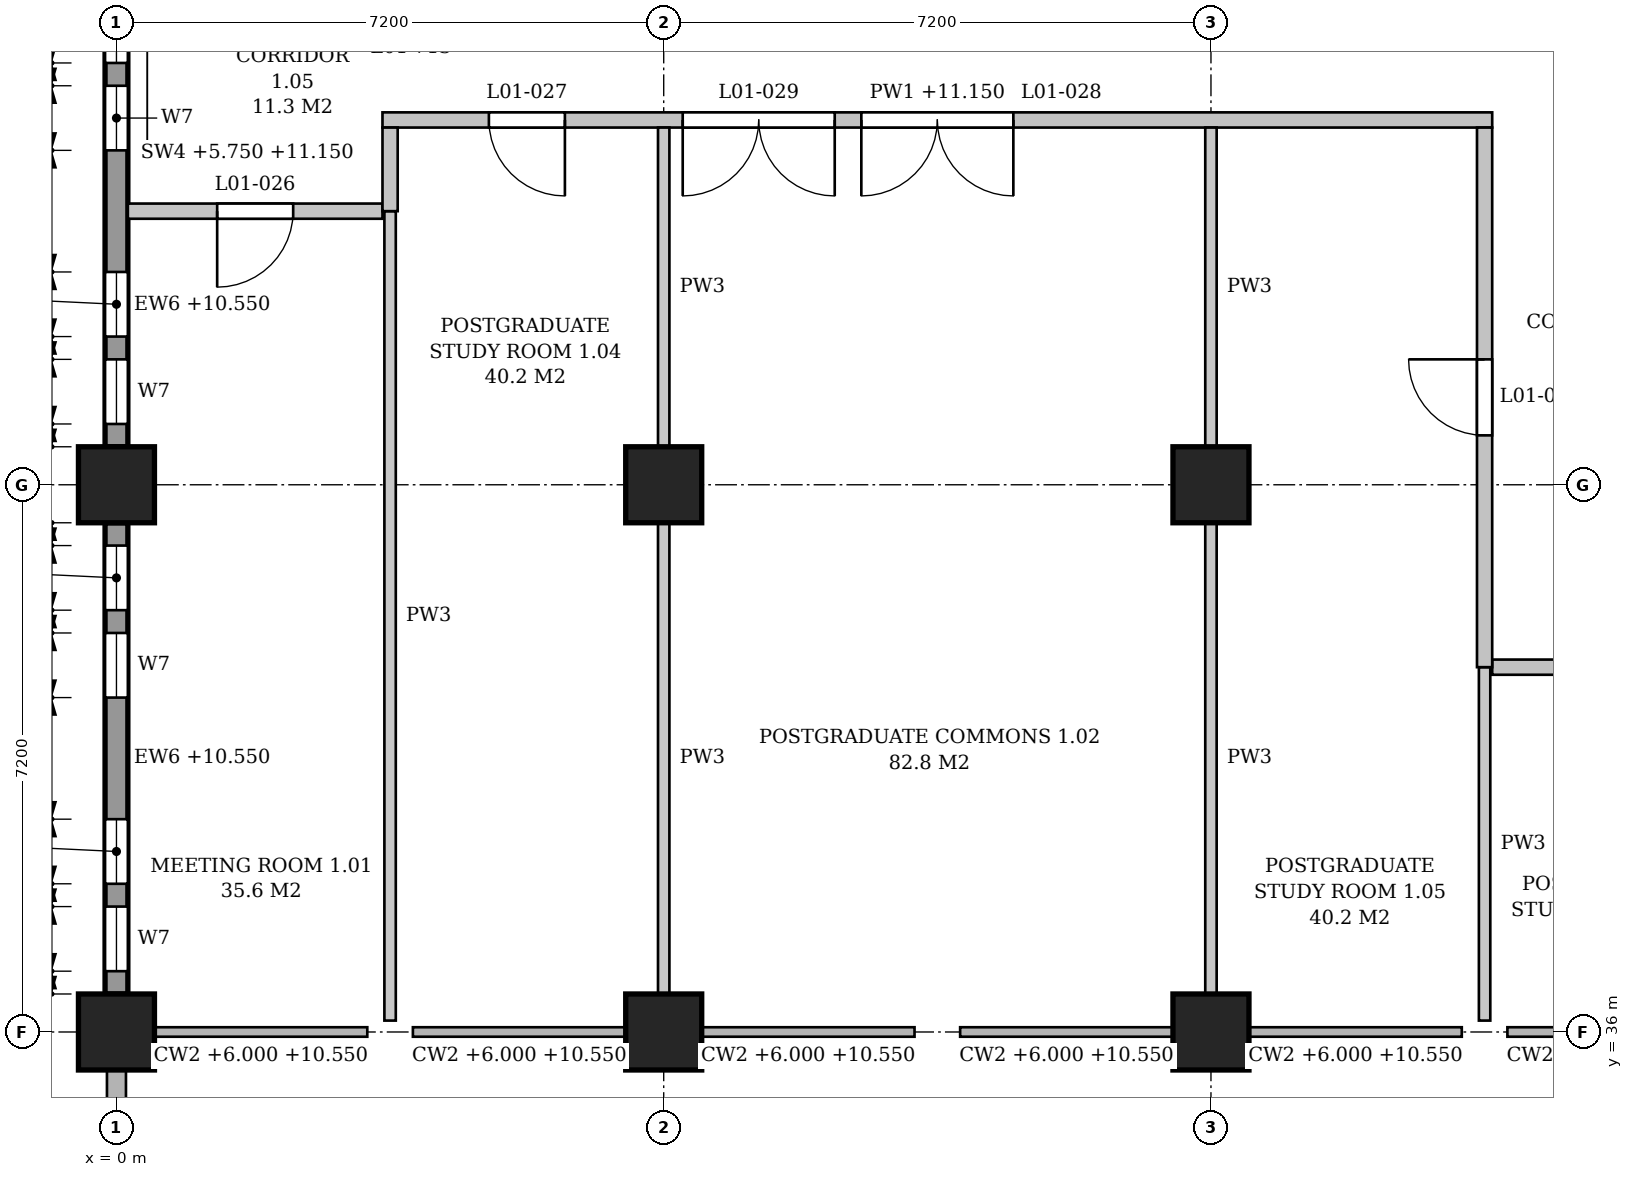
"""IFC4 building model, lengths in metres.
Left out: names, types, materials, properties, quantities, classifications, styles, units other than length and angle.
Written with IfcOpenShell. Run it as: python <this file> out.ifc"""

import sys

from ifc_helpers import new_model, si_unit, direction, frame, frame_2d, origin, origin_2d, place, context, subcontext, project, spatial, polyline, rectangle, outline, extrude, element, fill, save


model = new_model("IFC4")
c1 = context("Model", 3, precision=1e-05, world=origin(), true_north=direction((0.0, 1.0)))
c2 = subcontext(c1, "Body", "Model", "MODEL_VIEW")
j1 = project(units=[si_unit("LENGTHUNIT", "METRE"), si_unit("PLANEANGLEUNIT", "RADIAN")], contexts=[c1])
p1 = place(None, origin())
s1 = spatial("IfcSite", under=j1, at=p1, CompositionType="ELEMENT")
p2 = place(p1, origin())
s2 = spatial("IfcBuilding", under=s1, at=p2, CompositionType="ELEMENT")
p3 = place(p2, frame((0.0, 0.0, 6.0)))
s3 = spatial("IfcBuildingStorey", under=s2, at=p3, CompositionType="ELEMENT", Elevation=6.0)
for number, where, z_axis, x_axis in (
    (1, (0.0, 36.0, 0.0), (0.0, 0.0, 1.0), (1.0, 0.0, 0.0)),
    (2, (0.0, 43.2, 0.0), (0.0, 0.0, 1.0), (1.0, 0.0, 0.0)),
    (3, (7.2, 36.0, 0.0), (0.0, 0.0, 1.0), (1.0, 0.0, 0.0)),
    (4, (7.2, 43.2, 0.0), (0.0, 0.0, 1.0), (1.0, 0.0, 0.0)),
    (5, (14.4, 36.0, 0.0), (0.0, 0.0, 1.0), (1.0, 0.0, 0.0)),
    (6, (14.4, 43.2, 0.0), (0.0, 0.0, 1.0), (1.0, 0.0, 0.0)),
):
    element("IfcColumn", number, at=place(p3, frame(where, z_axis=z_axis, x_axis=x_axis)), inside=s3, PredefinedType="COLUMN", context=c2, shape_type="SweptSolid", body=[
        extrude(rectangle(XDim=1.0, YDim=1.0, at=origin_2d()), origin(), (0.0, 0.0, 1.0), 5.4),
    ])
p4 = place(p3, frame((0.0, 36.5, 0.0), z_axis=(0.0, 0.0, 1.0), x_axis=(0.0, 1.0, 0.0)))
e7 = element("IfcWall", 7, at=p4, inside=s3, PredefinedType="STANDARD", context=c2, shape_type="SweptSolid", body=[
    extrude(rectangle(XDim=6.2, YDim=0.3, at=frame_2d((3.1, 0.0))), origin(), (0.0, 0.0, 1.0), 4.55),
])
p5 = place(p4, frame((0.3, 0.0, 0.9)))
e8 = element("IfcOpeningElement", 8, at=p5, cuts=e7, PredefinedType="OPENING", context=c2, shape_type="SweptSolid", body=[
    extrude(outline(polyline([(0.0, 0.0), (0.85, 0.0), (0.85, 3.15), (0.425, 3.6), (0.0, 3.15), (0.0, 0.0)])), frame((0.0, 0.16, 0.0), z_axis=(0.0, -1.0, 0.0), x_axis=(1.0, 0.0, 0.0)), (0.0, 0.0, 1.0), 0.32),
])
p6 = place(p4, frame((1.45, 0.0, 0.9)))
e9 = element("IfcOpeningElement", 9, at=p6, cuts=e7, PredefinedType="OPENING", context=c2, shape_type="SweptSolid", body=[
    extrude(outline(polyline([(0.0, 0.0), (0.85, 0.0), (0.85, 3.15), (0.425, 3.6), (0.0, 3.15), (0.0, 0.0)])), frame((0.0, 0.16, 0.0), z_axis=(0.0, -1.0, 0.0), x_axis=(1.0, 0.0, 0.0)), (0.0, 0.0, 1.0), 0.32),
])
p7 = place(p4, frame((3.9, 0.0, 0.9)))
e10 = element("IfcOpeningElement", 10, at=p7, cuts=e7, PredefinedType="OPENING", context=c2, shape_type="SweptSolid", body=[
    extrude(outline(polyline([(0.0, 0.0), (0.85, 0.0), (0.85, 3.15), (0.425, 3.6), (0.0, 3.15), (0.0, 0.0)])), frame((0.0, 0.16, 0.0), z_axis=(0.0, -1.0, 0.0), x_axis=(1.0, 0.0, 0.0)), (0.0, 0.0, 1.0), 0.32),
])
p8 = place(p4, frame((5.05, 0.0, 0.9)))
e11 = element("IfcOpeningElement", 11, at=p8, cuts=e7, PredefinedType="OPENING", context=c2, shape_type="SweptSolid", body=[
    extrude(outline(polyline([(0.0, 0.0), (0.85, 0.0), (0.85, 3.15), (0.425, 3.6), (0.0, 3.15), (0.0, 0.0)])), frame((0.0, 0.16, 0.0), z_axis=(0.0, -1.0, 0.0), x_axis=(1.0, 0.0, 0.0)), (0.0, 0.0, 1.0), 0.32),
])
p9 = place(p3, frame((0.0, 43.7, 0.0), z_axis=(0.0, 0.0, 1.0), x_axis=(0.0, 1.0, 0.0)))
e12 = element("IfcWall", 12, at=p9, inside=s3, PredefinedType="STANDARD", context=c2, shape_type="SweptSolid", body=[
    extrude(rectangle(XDim=6.2, YDim=0.3, at=frame_2d((3.1, 0.0))), origin(), (0.0, 0.0, 1.0), 4.55),
])
p10 = place(p9, frame((0.3, 0.0, 0.9)))
e13 = element("IfcOpeningElement", 13, at=p10, cuts=e12, PredefinedType="OPENING", context=c2, shape_type="SweptSolid", body=[
    extrude(outline(polyline([(0.0, 0.0), (0.85, 0.0), (0.85, 3.15), (0.425, 3.6), (0.0, 3.15), (0.0, 0.0)])), frame((0.0, 0.16, 0.0), z_axis=(0.0, -1.0, 0.0), x_axis=(1.0, 0.0, 0.0)), (0.0, 0.0, 1.0), 0.32),
])
p11 = place(p9, frame((1.45, 0.0, 0.9)))
e14 = element("IfcOpeningElement", 14, at=p11, cuts=e12, PredefinedType="OPENING", context=c2, shape_type="SweptSolid", body=[
    extrude(outline(polyline([(0.0, 0.0), (0.85, 0.0), (0.85, 3.15), (0.425, 3.6), (0.0, 3.15), (0.0, 0.0)])), frame((0.0, 0.16, 0.0), z_axis=(0.0, -1.0, 0.0), x_axis=(1.0, 0.0, 0.0)), (0.0, 0.0, 1.0), 0.32),
])
p12 = place(p9, frame((3.9, 0.0, 0.9)))
e15 = element("IfcOpeningElement", 15, at=p12, cuts=e12, PredefinedType="OPENING", context=c2, shape_type="SweptSolid", body=[
    extrude(outline(polyline([(0.0, 0.0), (0.85, 0.0), (0.85, 3.15), (0.425, 3.6), (0.0, 3.15), (0.0, 0.0)])), frame((0.0, 0.16, 0.0), z_axis=(0.0, -1.0, 0.0), x_axis=(1.0, 0.0, 0.0)), (0.0, 0.0, 1.0), 0.32),
])
p13 = place(p9, frame((5.05, 0.0, 0.9)))
e16 = element("IfcOpeningElement", 16, at=p13, cuts=e12, PredefinedType="OPENING", context=c2, shape_type="SweptSolid", body=[
    extrude(outline(polyline([(0.0, 0.0), (0.85, 0.0), (0.85, 3.15), (0.425, 3.6), (0.0, 3.15), (0.0, 0.0)])), frame((0.0, 0.16, 0.0), z_axis=(0.0, -1.0, 0.0), x_axis=(1.0, 0.0, 0.0)), (0.0, 0.0, 1.0), 0.32),
])
p14 = place(p3, frame((18.1, 40.8, 0.0), z_axis=(0.0, 0.0, 1.0), x_axis=(1.0, 0.0, 0.0)))
e17 = element("IfcWall", 17, at=p14, inside=s3, PredefinedType="PARTITIONING", context=c2, shape_type="SweptSolid", body=[
    extrude(outline(polyline([(0.0, 0.0), (3.4, 0.0), (3.4, 4.4), (3.25, 4.4), (3.25, 5.15), (0.0, 5.15), (0.0, 0.0)])), frame((0.0, 0.1, 0.0), z_axis=(0.0, -1.0, 0.0), x_axis=(1.0, 0.0, 0.0)), (0.0, 0.0, 1.0), 0.2),
])
p15 = place(p14, frame((1.2, 0.0, 0.0)))
e18 = element("IfcOpeningElement", 18, at=p15, cuts=e17, PredefinedType="OPENING", context=c2, shape_type="SweptSolid", body=[
    extrude(rectangle(XDim=1.0, YDim=2.1, at=frame_2d((0.5, 1.05))), frame((0.0, 0.11, 0.0), z_axis=(0.0, -1.0, 0.0), x_axis=(1.0, 0.0, 0.0)), (0.0, 0.0, 1.0), 0.22),
])
p16 = place(p3, frame((0.15, 46.8, 0.0), z_axis=(0.0, 0.0, 1.0), x_axis=(1.0, 0.0, 0.0)))
e19 = element("IfcWall", 19, at=p16, inside=s3, PredefinedType="PARTITIONING", context=c2, shape_type="SweptSolid", body=[
    extrude(outline(polyline([(0.0, 0.0), (3.35, 0.0), (3.35, 5.15), (0.1, 5.15), (0.1, 4.55), (0.0, 4.55), (0.0, 0.0)])), frame((0.0, 0.1, 0.0), z_axis=(0.0, -1.0, 0.0), x_axis=(1.0, 0.0, 0.0)), (0.0, 0.0, 1.0), 0.2),
])
p17 = place(p16, frame((1.175, 0.0, 0.0)))
e20 = element("IfcOpeningElement", 20, at=p17, cuts=e19, PredefinedType="OPENING", context=c2, shape_type="SweptSolid", body=[
    extrude(rectangle(XDim=1.0, YDim=2.1, at=frame_2d((0.5, 1.05))), frame((0.0, 0.11, 0.0), z_axis=(0.0, -1.0, 0.0), x_axis=(1.0, 0.0, 0.0)), (0.0, 0.0, 1.0), 0.22),
])
p18 = place(p3, frame((3.5, 48.0, 0.0), z_axis=(0.0, 0.0, 1.0), x_axis=(1.0, 0.0, 0.0)))
e21 = element("IfcWall", 21, at=p18, inside=s3, PredefinedType="PARTITIONING", context=c2, shape_type="SweptSolid", body=[
    extrude(outline(polyline([(0.0, 0.0), (14.6, 0.0), (14.6, 5.15), (11.15, 5.15), (11.15, 4.4), (10.65, 4.4), (10.65, 5.15), (3.95, 5.15), (3.95, 4.4), (3.45, 4.4), (3.45, 5.15), (0.0, 5.15), (0.0, 0.0)])), frame((0.0, 0.1, 0.0), z_axis=(0.0, -1.0, 0.0), x_axis=(1.0, 0.0, 0.0)), (0.0, 0.0, 1.0), 0.2),
])
p19 = place(p18, frame((1.4, 0.0, 0.0)))
e22 = element("IfcOpeningElement", 22, at=p19, cuts=e21, PredefinedType="OPENING", context=c2, shape_type="SweptSolid", body=[
    extrude(rectangle(XDim=1.0, YDim=2.1, at=frame_2d((0.5, 1.05))), frame((0.0, 0.11, 0.0), z_axis=(0.0, -1.0, 0.0), x_axis=(1.0, 0.0, 0.0)), (0.0, 0.0, 1.0), 0.22),
])
p20 = place(p18, frame((6.3, 0.0, 0.0)))
e23 = element("IfcOpeningElement", 23, at=p20, cuts=e21, PredefinedType="OPENING", context=c2, shape_type="SweptSolid", body=[
    extrude(rectangle(XDim=2.0, YDim=2.1, at=frame_2d((1.0, 1.05))), frame((0.0, 0.11, 0.0), z_axis=(0.0, -1.0, 0.0), x_axis=(1.0, 0.0, 0.0)), (0.0, 0.0, 1.0), 0.22),
])
p21 = place(p18, frame((3.95, 0.0, 0.0)))
e24 = element("IfcOpeningElement", 24, at=p21, cuts=e21, PredefinedType="OPENING", context=c2, shape_type="SweptSolid", body=[
    extrude(rectangle(XDim=2.0, YDim=2.1, at=frame_2d((1.0, 1.05))), frame((0.0, 0.11, 0.0), z_axis=(0.0, -1.0, 0.0), x_axis=(1.0, 0.0, 0.0)), (0.0, 0.0, 1.0), 0.22),
])
p22 = place(p3, frame((3.6, 36.15, 0.0), z_axis=(0.0, 0.0, 1.0), x_axis=(0.0, 1.0, 0.0)))
e25 = element("IfcWall", 25, at=p22, inside=s3, PredefinedType="PARTITIONING", context=c2, shape_type="SweptSolid", body=[
    extrude(rectangle(XDim=10.65, YDim=0.15, at=frame_2d((5.325, 0.0))), origin(), (0.0, 0.0, 1.0), 4.4),
])
p23 = place(p3, frame((3.6, 46.8, 0.0), z_axis=(0.0, 0.0, 1.0), x_axis=(0.0, 1.0, 0.0)))
e26 = element("IfcWall", 26, at=p23, inside=s3, PredefinedType="PARTITIONING", context=c2, shape_type="SweptSolid", body=[
    extrude(rectangle(XDim=1.1, YDim=0.2, at=frame_2d((0.55, 0.0))), origin(), (0.0, 0.0, 1.0), 5.15),
])
p24 = place(p3, frame((7.2, 36.5, 0.0), z_axis=(0.0, 0.0, 1.0), x_axis=(0.0, 1.0, 0.0)))
e27 = element("IfcWall", 27, at=p24, inside=s3, PredefinedType="PARTITIONING", context=c2, shape_type="SweptSolid", body=[
    extrude(rectangle(XDim=6.2, YDim=0.15, at=frame_2d((3.1, 0.0))), origin(), (0.0, 0.0, 1.0), 4.4),
])
p25 = place(p3, frame((7.2, 43.7, 0.0), z_axis=(0.0, 0.0, 1.0), x_axis=(0.0, 1.0, 0.0)))
e28 = element("IfcWall", 28, at=p25, inside=s3, PredefinedType="PARTITIONING", context=c2, shape_type="SweptSolid", body=[
    extrude(rectangle(XDim=4.2, YDim=0.15, at=frame_2d((2.1, 0.0))), origin(), (0.0, 0.0, 1.0), 4.4),
])
p26 = place(p3, frame((14.4, 36.5, 0.0), z_axis=(0.0, 0.0, 1.0), x_axis=(0.0, 1.0, 0.0)))
e29 = element("IfcWall", 29, at=p26, inside=s3, PredefinedType="PARTITIONING", context=c2, shape_type="SweptSolid", body=[
    extrude(rectangle(XDim=6.2, YDim=0.15, at=frame_2d((3.1, 0.0))), origin(), (0.0, 0.0, 1.0), 4.4),
])
p27 = place(p3, frame((14.4, 43.7, 0.0), z_axis=(0.0, 0.0, 1.0), x_axis=(0.0, 1.0, 0.0)))
e30 = element("IfcWall", 30, at=p27, inside=s3, PredefinedType="PARTITIONING", context=c2, shape_type="SweptSolid", body=[
    extrude(rectangle(XDim=4.2, YDim=0.15, at=frame_2d((2.1, 0.0))), origin(), (0.0, 0.0, 1.0), 4.4),
])
p28 = place(p3, frame((18.0, 36.15, 0.0), z_axis=(0.0, 0.0, 1.0), x_axis=(0.0, 1.0, 0.0)))
e31 = element("IfcWall", 31, at=p28, inside=s3, PredefinedType="PARTITIONING", context=c2, shape_type="SweptSolid", body=[
    extrude(rectangle(XDim=4.65, YDim=0.15, at=frame_2d((2.325, 0.0))), origin(), (0.0, 0.0, 1.0), 4.4),
])
p29 = place(p3, frame((18.0, 40.8, 0.0), z_axis=(0.0, 0.0, 1.0), x_axis=(0.0, 1.0, 0.0)))
e32 = element("IfcWall", 32, at=p29, inside=s3, PredefinedType="PARTITIONING", context=c2, shape_type="SweptSolid", body=[
    extrude(outline(polyline([(0.0, 0.0), (7.1, 0.0), (7.1, 5.15), (2.65, 5.15), (2.65, 4.4), (2.15, 4.4), (2.15, 5.15), (0.0, 5.15), (0.0, 0.0)])), frame((0.0, 0.1, 0.0), z_axis=(0.0, -1.0, 0.0), x_axis=(1.0, 0.0, 0.0)), (0.0, 0.0, 1.0), 0.2),
])
p30 = place(p29, frame((3.05, 0.0, 0.0)))
e33 = element("IfcOpeningElement", 33, at=p30, cuts=e32, PredefinedType="OPENING", context=c2, shape_type="SweptSolid", body=[
    extrude(rectangle(XDim=1.0, YDim=2.1, at=frame_2d((0.5, 1.05))), frame((0.0, 0.11, 0.0), z_axis=(0.0, -1.0, 0.0), x_axis=(1.0, 0.0, 0.0)), (0.0, 0.0, 1.0), 0.22),
])
p31 = place(p5, origin())
e34 = element("IfcWindow", 34, at=p31, inside=s3, PartitioningType="SINGLE_PANEL", PredefinedType="WINDOW", context=c2, shape_type="SweptSolid", body=[
    extrude(outline(polyline([(0.0, 0.0), (0.85, 0.0), (0.85, 3.15), (0.425, 3.6), (0.0, 3.15), (0.0, 0.0)])), frame((0.0, 0.03, 0.0), z_axis=(0.0, -1.0, 0.0), x_axis=(1.0, 0.0, 0.0)), (0.0, 0.0, 1.0), 0.06),
])
fill(e8, e34)
p32 = place(p6, origin())
e35 = element("IfcWindow", 35, at=p32, inside=s3, PartitioningType="SINGLE_PANEL", PredefinedType="WINDOW", context=c2, shape_type="SweptSolid", body=[
    extrude(outline(polyline([(0.0, 0.0), (0.85, 0.0), (0.85, 3.15), (0.425, 3.6), (0.0, 3.15), (0.0, 0.0)])), frame((0.0, 0.03, 0.0), z_axis=(0.0, -1.0, 0.0), x_axis=(1.0, 0.0, 0.0)), (0.0, 0.0, 1.0), 0.06),
])
fill(e9, e35)
p33 = place(p7, origin())
e36 = element("IfcWindow", 36, at=p33, inside=s3, PartitioningType="SINGLE_PANEL", PredefinedType="WINDOW", context=c2, shape_type="SweptSolid", body=[
    extrude(outline(polyline([(0.0, 0.0), (0.85, 0.0), (0.85, 3.15), (0.425, 3.6), (0.0, 3.15), (0.0, 0.0)])), frame((0.0, 0.03, 0.0), z_axis=(0.0, -1.0, 0.0), x_axis=(1.0, 0.0, 0.0)), (0.0, 0.0, 1.0), 0.06),
])
fill(e10, e36)
p34 = place(p8, origin())
e37 = element("IfcWindow", 37, at=p34, inside=s3, PartitioningType="SINGLE_PANEL", PredefinedType="WINDOW", context=c2, shape_type="SweptSolid", body=[
    extrude(outline(polyline([(0.0, 0.0), (0.85, 0.0), (0.85, 3.15), (0.425, 3.6), (0.0, 3.15), (0.0, 0.0)])), frame((0.0, 0.03, 0.0), z_axis=(0.0, -1.0, 0.0), x_axis=(1.0, 0.0, 0.0)), (0.0, 0.0, 1.0), 0.06),
])
fill(e11, e37)
p35 = place(p10, origin())
e38 = element("IfcWindow", 38, at=p35, inside=s3, PartitioningType="SINGLE_PANEL", PredefinedType="WINDOW", context=c2, shape_type="SweptSolid", body=[
    extrude(outline(polyline([(0.0, 0.0), (0.85, 0.0), (0.85, 3.15), (0.425, 3.6), (0.0, 3.15), (0.0, 0.0)])), frame((0.0, 0.03, 0.0), z_axis=(0.0, -1.0, 0.0), x_axis=(1.0, 0.0, 0.0)), (0.0, 0.0, 1.0), 0.06),
])
fill(e13, e38)
p36 = place(p11, origin())
e39 = element("IfcWindow", 39, at=p36, inside=s3, PartitioningType="SINGLE_PANEL", PredefinedType="WINDOW", context=c2, shape_type="SweptSolid", body=[
    extrude(outline(polyline([(0.0, 0.0), (0.85, 0.0), (0.85, 3.15), (0.425, 3.6), (0.0, 3.15), (0.0, 0.0)])), frame((0.0, 0.03, 0.0), z_axis=(0.0, -1.0, 0.0), x_axis=(1.0, 0.0, 0.0)), (0.0, 0.0, 1.0), 0.06),
])
fill(e14, e39)
p37 = place(p12, origin())
e40 = element("IfcWindow", 40, at=p37, inside=s3, PartitioningType="SINGLE_PANEL", PredefinedType="WINDOW", context=c2, shape_type="SweptSolid", body=[
    extrude(outline(polyline([(0.0, 0.0), (0.85, 0.0), (0.85, 3.15), (0.425, 3.6), (0.0, 3.15), (0.0, 0.0)])), frame((0.0, 0.03, 0.0), z_axis=(0.0, -1.0, 0.0), x_axis=(1.0, 0.0, 0.0)), (0.0, 0.0, 1.0), 0.06),
])
fill(e15, e40)
p38 = place(p13, origin())
e41 = element("IfcWindow", 41, at=p38, inside=s3, PartitioningType="SINGLE_PANEL", PredefinedType="WINDOW", context=c2, shape_type="SweptSolid", body=[
    extrude(outline(polyline([(0.0, 0.0), (0.85, 0.0), (0.85, 3.15), (0.425, 3.6), (0.0, 3.15), (0.0, 0.0)])), frame((0.0, 0.03, 0.0), z_axis=(0.0, -1.0, 0.0), x_axis=(1.0, 0.0, 0.0)), (0.0, 0.0, 1.0), 0.06),
])
fill(e16, e41)
p39 = place(p17, frame((1.0, 0.0, 0.0), z_axis=(0.0, 0.0, 1.0), x_axis=(-1.0, 0.0, 0.0)))
e42 = element("IfcDoor", 42, at=p39, inside=s3, OperationType="SINGLE_SWING_RIGHT", PredefinedType="DOOR", context=c2, shape_type="SweptSolid", body=[
    extrude(rectangle(XDim=1.0, YDim=2.1, at=frame_2d((0.5, 1.05))), frame((0.0, 0.025, 0.0), z_axis=(0.0, -1.0, 0.0), x_axis=(1.0, 0.0, 0.0)), (0.0, 0.0, 1.0), 0.05),
])
fill(e20, e42)
p40 = place(p19, frame((1.0, 0.0, 0.0), z_axis=(0.0, 0.0, 1.0), x_axis=(-1.0, 0.0, 0.0)))
e43 = element("IfcDoor", 43, at=p40, inside=s3, OperationType="SINGLE_SWING_LEFT", PredefinedType="DOOR", context=c2, shape_type="SweptSolid", body=[
    extrude(rectangle(XDim=1.0, YDim=2.1, at=frame_2d((0.5, 1.05))), frame((0.0, 0.025, 0.0), z_axis=(0.0, -1.0, 0.0), x_axis=(1.0, 0.0, 0.0)), (0.0, 0.0, 1.0), 0.05),
])
fill(e22, e43)
p41 = place(p20, origin())
e44 = element("IfcDoor", 44, at=p41, inside=s3, OperationType="DOUBLE_DOOR_SINGLE_SWING", PredefinedType="DOOR", context=c2, shape_type="SweptSolid", body=[
    extrude(rectangle(XDim=2.0, YDim=2.1, at=frame_2d((1.0, 1.05))), frame((0.0, 0.025, 0.0), z_axis=(0.0, -1.0, 0.0), x_axis=(1.0, 0.0, 0.0)), (0.0, 0.0, 1.0), 0.05),
])
fill(e23, e44)
p42 = place(p21, origin())
e45 = element("IfcDoor", 45, at=p42, inside=s3, OperationType="DOUBLE_DOOR_SINGLE_SWING", PredefinedType="DOOR", context=c2, shape_type="SweptSolid", body=[
    extrude(rectangle(XDim=2.0, YDim=2.1, at=frame_2d((1.0, 1.05))), frame((0.0, 0.025, 0.0), z_axis=(0.0, -1.0, 0.0), x_axis=(1.0, 0.0, 0.0)), (0.0, 0.0, 1.0), 0.05),
])
fill(e24, e45)
p43 = place(p30, origin())
e46 = element("IfcDoor", 46, at=p43, inside=s3, OperationType="SINGLE_SWING_RIGHT", PredefinedType="DOOR", context=c2, shape_type="SweptSolid", body=[
    extrude(rectangle(XDim=1.0, YDim=2.1, at=frame_2d((0.5, 1.05))), frame((0.0, 0.025, 0.0), z_axis=(0.0, -1.0, 0.0), x_axis=(1.0, 0.0, 0.0)), (0.0, 0.0, 1.0), 0.05),
])
fill(e33, e46)
save(model, sys.argv[1])
